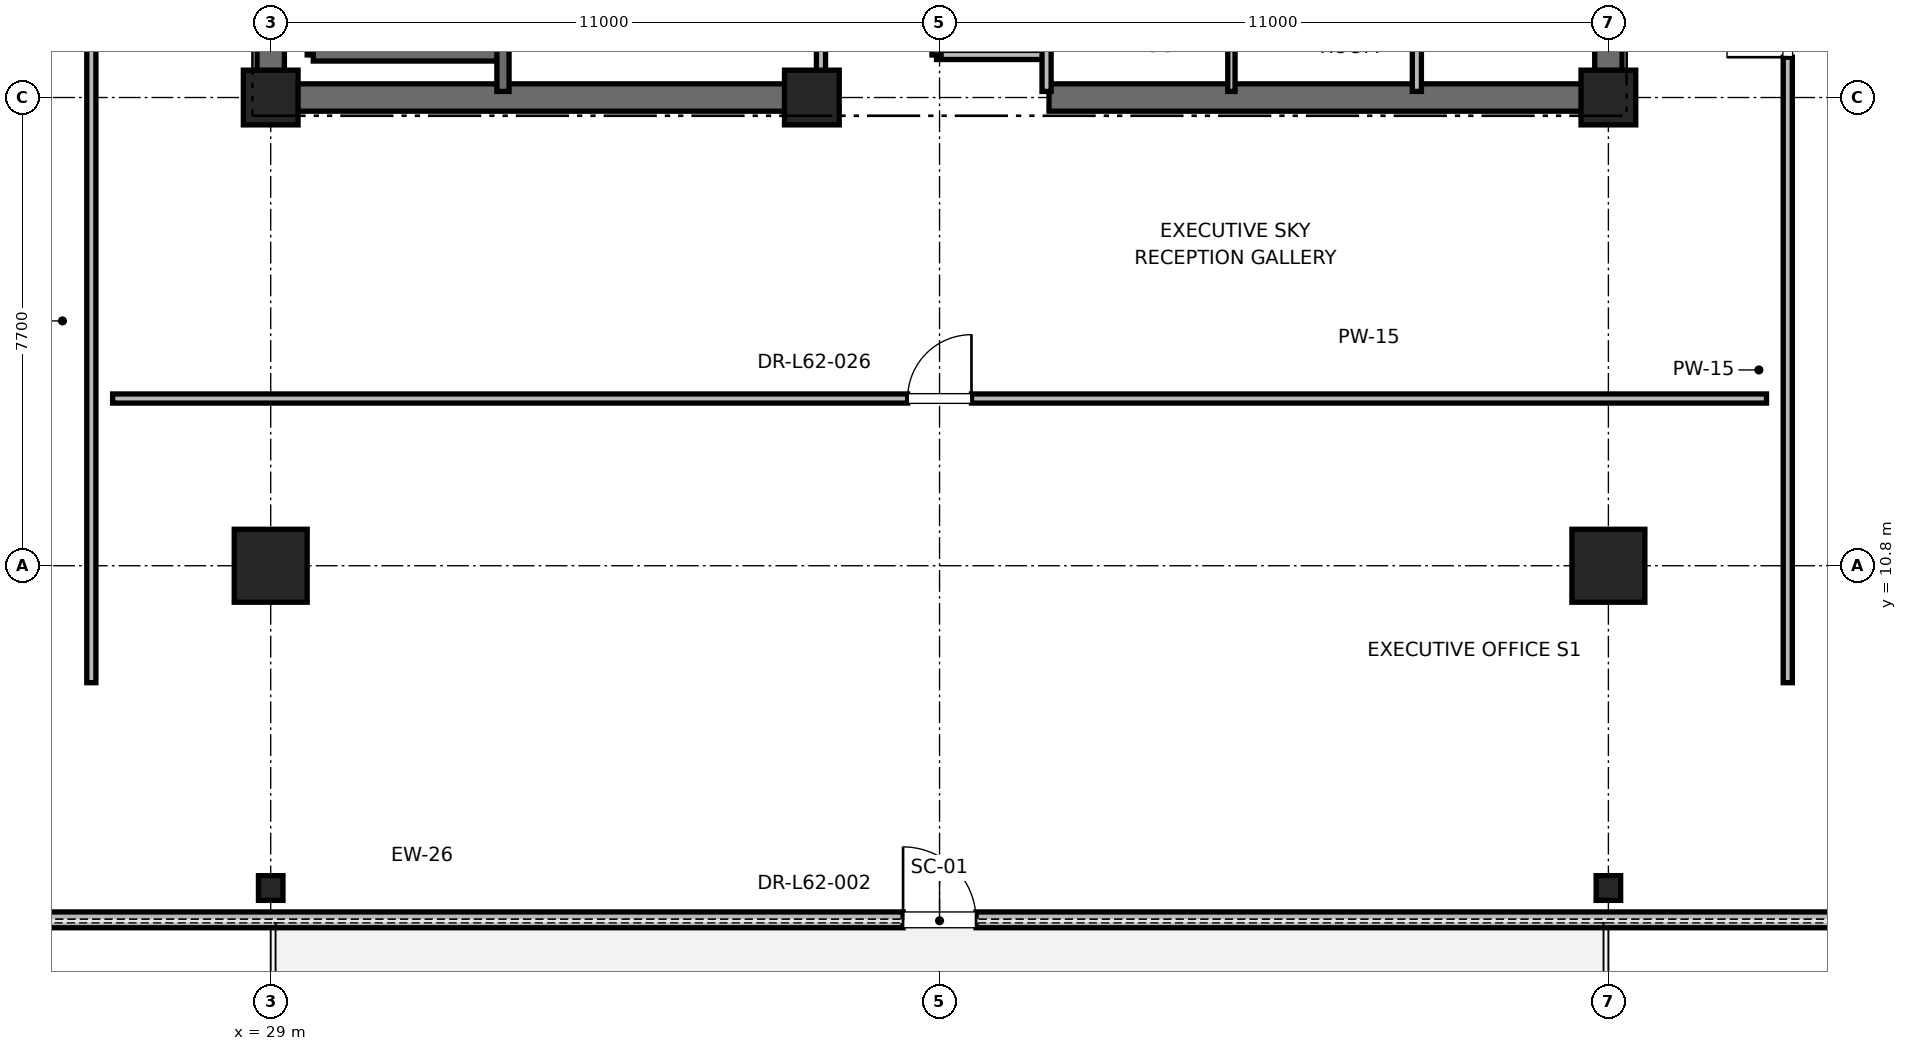
"""IFC4 building model, lengths in metres.
Left out: names, types, materials, properties, quantities, classifications, styles, units other than length and angle.
Written with IfcOpenShell. Run it as: python <this file> out.ifc"""

import sys

from ifc_helpers import new_model, si_unit, direction, frame, frame_2d, origin, origin_2d, place, context, subcontext, project, spatial, rectangle, i_section, extrude, element, fill, save


model = new_model("IFC4")
c1 = context("Model", 3, precision=1e-05, world=origin(), true_north=direction((0.0, 1.0)))
c2 = subcontext(c1, "Body", "Model", "MODEL_VIEW")
j1 = project(units=[si_unit("LENGTHUNIT", "METRE"), si_unit("PLANEANGLEUNIT", "RADIAN")], contexts=[c1])
p1 = place(None, origin())
s1 = spatial("IfcSite", under=j1, at=p1, CompositionType="ELEMENT")
p2 = place(p1, origin())
s2 = spatial("IfcBuilding", under=s1, at=p2, CompositionType="ELEMENT")
p3 = place(p2, frame((0.0, 0.0, 267.2)))
s3 = spatial("IfcBuildingStorey", under=s2, at=p3, CompositionType="ELEMENT", Elevation=267.2)
for number, where, z_axis, x_axis in (
    (1, (29.0, 10.8, 0.0), (0.0, 0.0, 1.0), (1.0, 0.0, 0.0)),
    (2, (51.0, 10.8, 0.0), (0.0, 0.0, 1.0), (1.0, 0.0, 0.0)),
):
    element("IfcColumn", number, at=place(p3, frame(where, z_axis=z_axis, x_axis=x_axis)), inside=s3, PredefinedType="COLUMN", context=c2, shape_type="SweptSolid", body=[
        extrude(rectangle(XDim=1.2, YDim=1.2, at=origin_2d()), origin(), (0.0, 0.0, 1.0), 4.0),
    ])
for number, where, z_axis, x_axis in (
    (3, (29.0, 5.5, 0.0), (0.0, 0.0, 1.0), (1.0, 0.0, 0.0)),
    (4, (51.0, 5.5, 0.0), (0.0, 0.0, 1.0), (1.0, 0.0, 0.0)),
):
    element("IfcColumn", number, at=place(p3, frame(where, z_axis=z_axis, x_axis=x_axis)), inside=s3, PredefinedType="COLUMN", context=c2, shape_type="SweptSolid", body=[
        extrude(i_section(OverallWidth=0.403, OverallDepth=0.406, WebThickness=0.027, FlangeThickness=0.043, FilletRadius=0.015, at=origin_2d()), origin(), (0.0, 0.0, 1.0), 4.0),
    ])
for number, where, z_axis, x_axis in (
    (5, (29.0, 18.5, 0.0), (0.0, 0.0, 1.0), (1.0, 0.0, 0.0)),
    (6, (51.0, 18.5, 0.0), (0.0, 0.0, 1.0), (1.0, 0.0, 0.0)),
    (7, (37.9, 18.5, 0.0), (0.0, 0.0, 1.0), (1.0, 0.0, 0.0)),
):
    element("IfcColumn", number, at=place(p3, frame(where, z_axis=z_axis, x_axis=x_axis)), inside=s3, PredefinedType="PILASTER", context=c2, shape_type="SweptSolid", body=[
        extrude(rectangle(XDim=0.9, YDim=0.9, at=origin_2d()), origin(), (0.0, 0.0, 1.0), 4.0),
    ])
for number, where, z_axis, x_axis in (
    (8, (29.0, 18.5, 0.0), (0.0, 0.0, 1.0), (1.0, 0.0, 0.0)),
    (9, (41.8, 18.5, 0.0), (0.0, 0.0, 1.0), (1.0, 0.0, 0.0)),
):
    element("IfcWall", number, at=place(p3, frame(where, z_axis=z_axis, x_axis=x_axis)), inside=s3, PredefinedType="SHEAR", context=c2, shape_type="SweptSolid", body=[
        extrude(rectangle(XDim=9.2, YDim=0.45, at=frame_2d((4.6, 0.0))), origin(), (0.0, 0.0, 1.0), 3.785),
    ])
p4 = place(p3, frame((29.0, 18.5, 0.0), z_axis=(0.0, 0.0, 1.0), x_axis=(0.0, 1.0, 0.0)))
e10 = element("IfcWall", 10, at=p4, inside=s3, PredefinedType="SHEAR", context=c2, shape_type="SweptSolid", body=[
    extrude(rectangle(XDim=8.8, YDim=0.45, at=frame_2d((4.4, 0.0))), origin(), (0.0, 0.0, 1.0), 3.785),
])
p5 = place(p3, frame((51.0, 18.5, 0.0), z_axis=(0.0, 0.0, 1.0), x_axis=(0.0, 1.0, 0.0)))
e11 = element("IfcWall", 11, at=p5, inside=s3, PredefinedType="SHEAR", context=c2, shape_type="SweptSolid", body=[
    extrude(rectangle(XDim=5.8, YDim=0.45, at=frame_2d((2.9, 0.0))), origin(), (0.0, 0.0, 1.0), 3.785),
])
p6 = place(p3, frame((17.779, 4.977, 0.0), z_axis=(0.0, 0.0, 1.0), x_axis=(1.0, 0.0, 0.0)))
e12 = element("IfcWall", 12, at=p6, inside=s3, PredefinedType="PARAPET", context=c2, shape_type="SweptSolid", body=[
    extrude(rectangle(XDim=44.441, YDim=0.26, at=frame_2d((22.221, 0.0))), origin(), (0.0, 0.0, 1.0), 3.123),
])
p7 = place(p6, frame((4.2, 0.0, 0.85)))
e13 = element("IfcOpeningElement", 13, at=p7, cuts=e12, PredefinedType="OPENING", context=c2, shape_type="SweptSolid", body=[
    extrude(rectangle(XDim=1.6, YDim=2.1, at=frame_2d((0.8, 1.05))), frame((0.0, 0.13, 0.0), z_axis=(0.0, -1.0, 0.0), x_axis=(1.0, 0.0, 0.0)), (0.0, 0.0, 1.0), 0.26),
])
p8 = place(p6, frame((21.621, 0.0, 0.0)))
e14 = element("IfcOpeningElement", 14, at=p8, cuts=e12, PredefinedType="OPENING", context=c2, shape_type="SweptSolid", body=[
    extrude(rectangle(XDim=1.2, YDim=2.2, at=frame_2d((0.6, 1.1))), frame((0.0, 0.13, 0.0), z_axis=(0.0, -1.0, 0.0), x_axis=(1.0, 0.0, 0.0)), (0.0, 0.0, 1.0), 0.26),
])
p9 = place(p6, frame((38.641, 0.0, 0.85)))
e15 = element("IfcOpeningElement", 15, at=p9, cuts=e12, PredefinedType="OPENING", context=c2, shape_type="SweptSolid", body=[
    extrude(rectangle(XDim=1.6, YDim=2.1, at=frame_2d((0.8, 1.05))), frame((0.0, 0.13, 0.0), z_axis=(0.0, -1.0, 0.0), x_axis=(1.0, 0.0, 0.0)), (0.0, 0.0, 1.0), 0.26),
])
p10 = place(p3, frame((29.7, 19.2, 0.0), z_axis=(0.0, 0.0, 1.0), x_axis=(0.0, 1.0, 0.0)))
e16 = element("IfcWall", 16, at=p10, inside=s3, PredefinedType="SOLIDWALL", context=c2, shape_type="SweptSolid", body=[
    extrude(rectangle(XDim=8.15, YDim=0.2, at=frame_2d((4.075, 0.0))), origin(), (0.0, 0.0, 1.0), 3.785),
])
p11 = place(p3, frame((29.7, 19.2, 0.0), z_axis=(0.0, 0.0, 1.0), x_axis=(1.0, 0.0, 0.0)))
e17 = element("IfcWall", 17, at=p11, inside=s3, PredefinedType="SOLIDWALL", context=c2, shape_type="SweptSolid", body=[
    extrude(rectangle(XDim=3.12, YDim=0.2, at=frame_2d((1.56, 0.0))), origin(), (0.0, 0.0, 1.0), 3.785),
])
p12 = place(p3, frame((32.82, 18.6, 0.0), z_axis=(0.0, 0.0, 1.0), x_axis=(0.0, 1.0, 0.0)))
e18 = element("IfcWall", 18, at=p12, inside=s3, PredefinedType="SOLIDWALL", context=c2, shape_type="SweptSolid", body=[
    extrude(rectangle(XDim=8.78, YDim=0.2, at=frame_2d((4.39, 0.0))), origin(), (0.0, 0.0, 1.0), 3.785),
])
p13 = place(p3, frame((39.95, 19.2, 0.0), z_axis=(0.0, 0.0, 1.0), x_axis=(1.0, 0.0, 0.0)))
e19 = element("IfcWall", 19, at=p13, inside=s3, PredefinedType="PARTITIONING", context=c2, shape_type="SweptSolid", body=[
    extrude(rectangle(XDim=1.81, YDim=0.15, at=frame_2d((0.905, 0.0))), origin(), (0.0, 0.0, 1.0), 2.85),
])
p14 = place(p3, frame((41.76, 18.6, 0.0), z_axis=(0.0, 0.0, 1.0), x_axis=(0.0, 1.0, 0.0)))
e20 = element("IfcWall", 20, at=p14, inside=s3, PredefinedType="PARTITIONING", context=c2, shape_type="SweptSolid", body=[
    extrude(rectangle(XDim=3.6, YDim=0.15, at=frame_2d((1.8, 0.0))), origin(), (0.0, 0.0, 1.0), 2.85),
])
p15 = place(p3, frame((39.95, 19.2, 0.0), z_axis=(0.0, 0.0, 1.0), x_axis=(0.0, 1.0, 0.0)))
e21 = element("IfcWall", 21, at=p15, inside=s3, PredefinedType="PARTITIONING", context=c2, shape_type="SweptSolid", body=[
    extrude(rectangle(XDim=3.0, YDim=0.15, at=frame_2d((1.5, 0.0))), origin(), (0.0, 0.0, 1.0), 2.85),
])
p16 = place(p15, frame((1.05, 0.0, 0.0)))
e22 = element("IfcOpeningElement", 22, at=p16, cuts=e21, PredefinedType="OPENING", context=c2, shape_type="SweptSolid", body=[
    extrude(rectangle(XDim=0.9, YDim=2.1, at=frame_2d((0.45, 1.05))), frame((0.0, 0.075, 0.0), z_axis=(0.0, -1.0, 0.0), x_axis=(1.0, 0.0, 0.0)), (0.0, 0.0, 1.0), 0.15),
])
p17 = place(p3, frame((38.05, 18.6, 0.0), z_axis=(0.0, 0.0, 1.0), x_axis=(0.0, 1.0, 0.0)))
e23 = element("IfcWall", 23, at=p17, inside=s3, PredefinedType="PARTITIONING", context=c2, shape_type="SweptSolid", body=[
    extrude(rectangle(XDim=4.46, YDim=0.15, at=frame_2d((2.23, 0.0))), origin(), (0.0, 0.0, 1.0), 2.85),
])
p18 = place(p17, frame((1.73, 0.0, 0.0)))
e24 = element("IfcOpeningElement", 24, at=p18, cuts=e23, PredefinedType="OPENING", context=c2, shape_type="SweptSolid", body=[
    extrude(rectangle(XDim=1.0, YDim=2.15, at=frame_2d((0.5, 1.075))), frame((0.0, 0.075, 0.0), z_axis=(0.0, -1.0, 0.0), x_axis=(1.0, 0.0, 0.0)), (0.0, 0.0, 1.0), 0.15),
])
p19 = place(p3, frame((47.85, 18.6, 0.0), z_axis=(0.0, 0.0, 1.0), x_axis=(0.0, 1.0, 0.0)))
e25 = element("IfcWall", 25, at=p19, inside=s3, PredefinedType="PARTITIONING", context=c2, shape_type="SweptSolid", body=[
    extrude(rectangle(XDim=2.54, YDim=0.15, at=frame_2d((1.27, 0.0))), origin(), (0.0, 0.0, 1.0), 2.85),
])
p20 = place(p3, frame((44.8, 18.6, 0.0), z_axis=(0.0, 0.0, 1.0), x_axis=(0.0, 1.0, 0.0)))
e26 = element("IfcWall", 26, at=p20, inside=s3, PredefinedType="PARTITIONING", context=c2, shape_type="SweptSolid", body=[
    extrude(rectangle(XDim=3.02, YDim=0.12, at=frame_2d((1.51, 0.0))), origin(), (0.0, 0.0, 1.0), 2.85),
])
p21 = place(p3, frame((26.4, 13.55, 0.0), z_axis=(0.0, 0.0, 1.0), x_axis=(1.0, 0.0, 0.0)))
e27 = element("IfcWall", 27, at=p21, inside=s3, PredefinedType="PARTITIONING", context=c2, shape_type="SweptSolid", body=[
    extrude(rectangle(XDim=27.2, YDim=0.15, at=frame_2d((13.6, 0.0))), origin(), (0.0, 0.0, 1.0), 2.85),
])
p22 = place(p21, frame((13.075, 0.0, 0.0)))
e28 = element("IfcOpeningElement", 28, at=p22, cuts=e27, PredefinedType="OPENING", context=c2, shape_type="SweptSolid", body=[
    extrude(rectangle(XDim=1.05, YDim=2.2, at=frame_2d((0.525, 1.1))), frame((0.0, 0.075, 0.0), z_axis=(0.0, -1.0, 0.0), x_axis=(1.0, 0.0, 0.0)), (0.0, 0.0, 1.0), 0.15),
])
p23 = place(p3, frame((26.05, 8.877, 0.0), z_axis=(0.0, 0.0, 1.0), x_axis=(0.0, 1.0, 0.0)))
e29 = element("IfcWall", 29, at=p23, inside=s3, PredefinedType="PARTITIONING", context=c2, shape_type="SweptSolid", body=[
    extrude(rectangle(XDim=15.644, YDim=0.15, at=frame_2d((7.822, 0.0))), origin(), (0.0, 0.0, 1.0), 2.85),
])
p24 = place(p23, frame((11.899, 0.0, 0.0)))
e30 = element("IfcOpeningElement", 30, at=p24, cuts=e29, PredefinedType="OPENING", context=c2, shape_type="SweptSolid", body=[
    extrude(rectangle(XDim=1.5, YDim=2.25, at=frame_2d((0.75, 1.125))), frame((0.0, 0.075, 0.0), z_axis=(0.0, -1.0, 0.0), x_axis=(1.0, 0.0, 0.0)), (0.0, 0.0, 1.0), 0.15),
])
p25 = place(p3, frame((53.95, 8.877, 0.0), z_axis=(0.0, 0.0, 1.0), x_axis=(0.0, 1.0, 0.0)))
e31 = element("IfcWall", 31, at=p25, inside=s3, PredefinedType="PARTITIONING", context=c2, shape_type="SweptSolid", body=[
    extrude(rectangle(XDim=11.919, YDim=0.15, at=frame_2d((5.959, 0.0))), origin(), (0.0, 0.0, 1.0), 2.85),
])
p26 = place(p25, frame((10.286, 0.0, 0.0)))
e32 = element("IfcOpeningElement", 32, at=p26, cuts=e31, PredefinedType="OPENING", context=c2, shape_type="SweptSolid", body=[
    extrude(rectangle(XDim=1.0, YDim=2.15, at=frame_2d((0.5, 1.075))), frame((0.0, 0.075, 0.0), z_axis=(0.0, -1.0, 0.0), x_axis=(1.0, 0.0, 0.0)), (0.0, 0.0, 1.0), 0.15),
])
p27 = place(p8, origin())
e33 = element("IfcDoor", 33, at=p27, inside=s3, OperationType="SINGLE_SWING_LEFT", PredefinedType="DOOR", context=c2, shape_type="SweptSolid", body=[
    extrude(rectangle(XDim=1.2, YDim=2.2, at=frame_2d((0.6, 1.1))), frame((0.0, 0.025, 0.0), z_axis=(0.0, -1.0, 0.0), x_axis=(1.0, 0.0, 0.0)), (0.0, 0.0, 1.0), 0.05),
])
fill(e14, e33)
p28 = place(p22, origin())
e34 = element("IfcDoor", 34, at=p28, inside=s3, OperationType="SINGLE_SWING_RIGHT", PredefinedType="DOOR", context=c2, shape_type="SweptSolid", body=[
    extrude(rectangle(XDim=1.05, YDim=2.2, at=frame_2d((0.525, 1.1))), frame((0.0, 0.025, 0.0), z_axis=(0.0, -1.0, 0.0), x_axis=(1.0, 0.0, 0.0)), (0.0, 0.0, 1.0), 0.05),
])
fill(e28, e34)
p29 = place(p26, origin())
e35 = element("IfcDoor", 35, at=p29, inside=s3, OperationType="SINGLE_SWING_LEFT", PredefinedType="DOOR", context=c2, shape_type="SweptSolid", body=[
    extrude(rectangle(XDim=1.0, YDim=2.15, at=frame_2d((0.5, 1.075))), frame((0.0, 0.025, 0.0), z_axis=(0.0, -1.0, 0.0), x_axis=(1.0, 0.0, 0.0)), (0.0, 0.0, 1.0), 0.05),
])
fill(e32, e35)
save(model, sys.argv[1])
